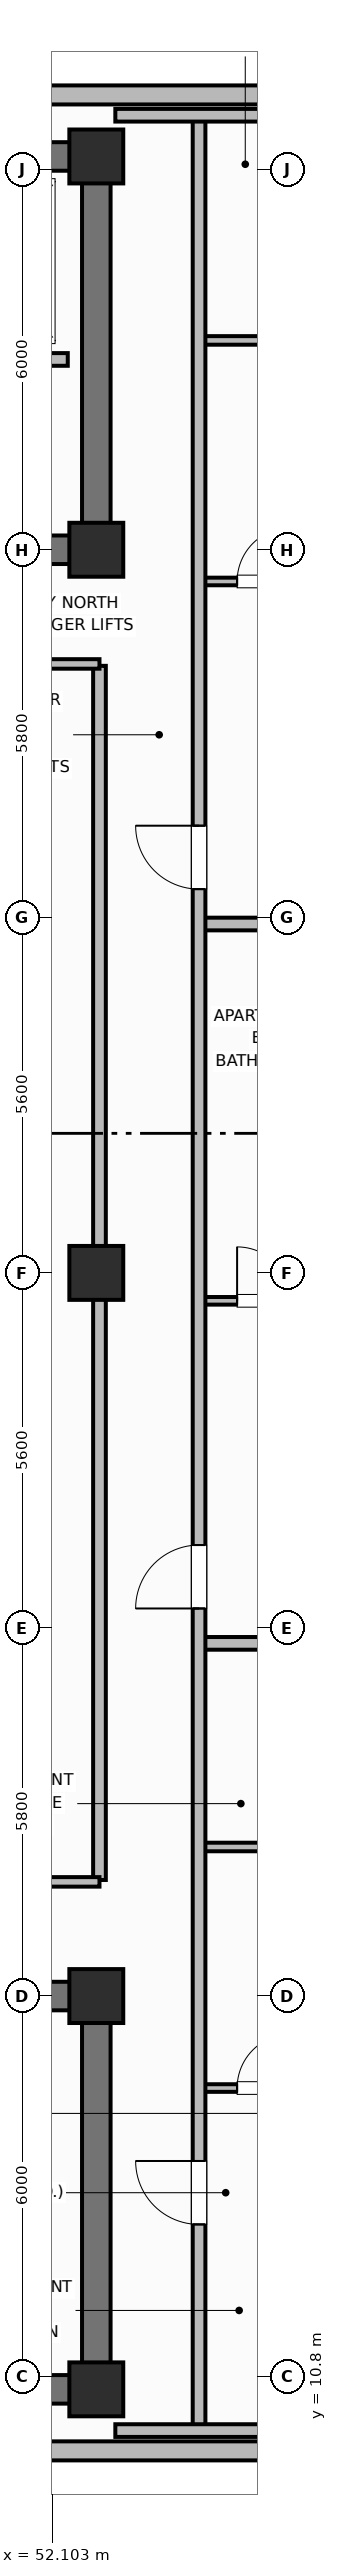
"""IFC4 building model, lengths in metres.
Left out: names, types, materials, properties, quantities, classifications, styles, units other than length and angle.
Written with IfcOpenShell. Run it as: python <this file> out.ifc"""

import sys

from ifc_helpers import new_model, si_unit, direction, frame, frame_2d, origin, origin_2d, place, context, subcontext, project, spatial, rectangle, extrude, element, fill, save


model = new_model("IFC4")
c1 = context("Model", 3, precision=1e-05, world=origin(), true_north=direction((0.0, 1.0)))
c2 = subcontext(c1, "Body", "Model", "MODEL_VIEW")
j1 = project(units=[si_unit("LENGTHUNIT", "METRE"), si_unit("PLANEANGLEUNIT", "RADIAN")], contexts=[c1])
p1 = place(None, origin())
s1 = spatial("IfcSite", under=j1, at=p1, CompositionType="ELEMENT")
p2 = place(p1, origin())
s2 = spatial("IfcBuilding", under=s1, at=p2, CompositionType="ELEMENT")
p3 = place(p2, frame((0.0, 0.0, 229.5)))
s3 = spatial("IfcBuildingStorey", under=s2, at=p3, CompositionType="ELEMENT", Elevation=229.5)
p4 = place(p3, frame((52.8, 10.6, 0.0), z_axis=(0.0, 0.0, 1.0), x_axis=(-1.0, 0.0, 0.0)))
e1 = element("IfcWall", 1, at=p4, inside=s3, PredefinedType="SHEAR", context=c2, shape_type="SweptSolid", body=[
    extrude(rectangle(XDim=27.2, YDim=0.45, at=frame_2d((13.6, 0.0))), origin(), (0.0, 0.0, 1.0), 3.7),
])
p5 = place(p3, frame((52.8, 10.825, 0.0), z_axis=(0.0, 0.0, 1.0), x_axis=(0.0, 1.0, 0.0)))
e2 = element("IfcWall", 2, at=p5, inside=s3, PredefinedType="SHEAR", context=c2, shape_type="SweptSolid", body=[
    extrude(rectangle(XDim=5.75, YDim=0.45, at=frame_2d((2.875, 0.0))), origin(), (0.0, 0.0, 1.0), 3.7),
])
p6 = place(p3, frame((25.6, 16.8, 0.0), z_axis=(0.0, 0.0, 1.0), x_axis=(1.0, 0.0, 0.0)))
e3 = element("IfcWall", 3, at=p6, inside=s3, PredefinedType="SHEAR", context=c2, shape_type="SweptSolid", body=[
    extrude(rectangle(XDim=27.2, YDim=0.45, at=frame_2d((13.6, 0.0))), origin(), (0.0, 0.0, 1.0), 3.7),
])
p7 = place(p6, frame((1.9, 0.0, 0.0)))
e4 = element("IfcOpeningElement", 4, at=p7, cuts=e3, PredefinedType="OPENING", context=c2, shape_type="SweptSolid", body=[
    extrude(rectangle(XDim=1.1, YDim=2.15, at=frame_2d((0.55, 1.075))), frame((0.0, 0.235, 0.0), z_axis=(0.0, -1.0, 0.0), x_axis=(1.0, 0.0, 0.0)), (0.0, 0.0, 1.0), 0.47),
])
p8 = place(p6, frame((13.0, 0.0, 0.0)))
e5 = element("IfcOpeningElement", 5, at=p8, cuts=e3, PredefinedType="OPENING", context=c2, shape_type="SweptSolid", body=[
    extrude(rectangle(XDim=1.2, YDim=2.15, at=frame_2d((0.6, 1.075))), frame((0.0, 0.235, 0.0), z_axis=(0.0, -1.0, 0.0), x_axis=(1.0, 0.0, 0.0)), (0.0, 0.0, 1.0), 0.47),
])
p9 = place(p6, frame((21.6, 0.0, 0.0)))
e6 = element("IfcOpeningElement", 6, at=p9, cuts=e3, PredefinedType="OPENING", context=c2, shape_type="SweptSolid", body=[
    extrude(rectangle(XDim=1.0, YDim=2.15, at=frame_2d((0.5, 1.075))), frame((0.0, 0.235, 0.0), z_axis=(0.0, -1.0, 0.0), x_axis=(1.0, 0.0, 0.0)), (0.0, 0.0, 1.0), 0.47),
])
p10 = place(p3, frame((25.6, 45.8, 0.0), z_axis=(0.0, 0.0, 1.0), x_axis=(1.0, 0.0, 0.0)))
e7 = element("IfcWall", 7, at=p10, inside=s3, PredefinedType="SHEAR", context=c2, shape_type="SweptSolid", body=[
    extrude(rectangle(XDim=27.2, YDim=0.45, at=frame_2d((13.6, 0.0))), origin(), (0.0, 0.0, 1.0), 3.7),
])
p11 = place(p3, frame((52.8, 39.825, 0.0), z_axis=(0.0, 0.0, 1.0), x_axis=(0.0, 1.0, 0.0)))
e8 = element("IfcWall", 8, at=p11, inside=s3, PredefinedType="SHEAR", context=c2, shape_type="SweptSolid", body=[
    extrude(rectangle(XDim=5.75, YDim=0.45, at=frame_2d((2.875, 0.0))), origin(), (0.0, 0.0, 1.0), 3.7),
])
p12 = place(p3, frame((52.8, 39.6, 0.0), z_axis=(0.0, 0.0, 1.0), x_axis=(-1.0, 0.0, 0.0)))
e9 = element("IfcWall", 9, at=p12, inside=s3, PredefinedType="SHEAR", context=c2, shape_type="SweptSolid", body=[
    extrude(rectangle(XDim=27.2, YDim=0.45, at=frame_2d((13.6, 0.0))), origin(), (0.0, 0.0, 1.0), 3.7),
])
p13 = place(p12, frame((24.2, 0.0, 0.0)))
e10 = element("IfcOpeningElement", 10, at=p13, cuts=e9, PredefinedType="OPENING", context=c2, shape_type="SweptSolid", body=[
    extrude(rectangle(XDim=1.1, YDim=2.15, at=frame_2d((0.55, 1.075))), frame((0.0, 0.235, 0.0), z_axis=(0.0, -1.0, 0.0), x_axis=(1.0, 0.0, 0.0)), (0.0, 0.0, 1.0), 0.47),
])
p14 = place(p12, frame((15.1, 0.0, 0.0)))
e11 = element("IfcOpeningElement", 11, at=p14, cuts=e9, PredefinedType="OPENING", context=c2, shape_type="SweptSolid", body=[
    extrude(rectangle(XDim=1.2, YDim=2.15, at=frame_2d((0.6, 1.075))), frame((0.0, 0.235, 0.0), z_axis=(0.0, -1.0, 0.0), x_axis=(1.0, 0.0, 0.0)), (0.0, 0.0, 1.0), 0.47),
])
p15 = place(p12, frame((11.6, 0.0, 0.0)))
e12 = element("IfcOpeningElement", 12, at=p15, cuts=e9, PredefinedType="OPENING", context=c2, shape_type="SweptSolid", body=[
    extrude(rectangle(XDim=0.9, YDim=2.1, at=frame_2d((0.45, 1.05))), frame((0.0, 0.235, 0.0), z_axis=(0.0, -1.0, 0.0), x_axis=(1.0, 0.0, 0.0)), (0.0, 0.0, 1.0), 0.47),
])
p16 = place(p12, frame((7.35, 0.0, 0.0)))
e13 = element("IfcOpeningElement", 13, at=p16, cuts=e9, PredefinedType="OPENING", context=c2, shape_type="SweptSolid", body=[
    extrude(rectangle(XDim=0.85, YDim=2.1, at=frame_2d((0.425, 1.05))), frame((0.0, 0.235, 0.0), z_axis=(0.0, -1.0, 0.0), x_axis=(1.0, 0.0, 0.0)), (0.0, 0.0, 1.0), 0.47),
])
p17 = place(p12, frame((4.2, 0.0, 0.0)))
e14 = element("IfcOpeningElement", 14, at=p17, cuts=e9, PredefinedType="OPENING", context=c2, shape_type="SweptSolid", body=[
    extrude(rectangle(XDim=1.3, YDim=2.2, at=frame_2d((0.65, 1.1))), frame((0.0, 0.235, 0.0), z_axis=(0.0, -1.0, 0.0), x_axis=(1.0, 0.0, 0.0)), (0.0, 0.0, 1.0), 0.47),
])
for number, where, z_axis, x_axis in (
    (15, (52.8, 10.6, 0.0), (0.0, 0.0, 1.0), (1.0, 0.0, 0.0)),
    (16, (52.8, 16.8, 0.0), (0.0, 0.0, 1.0), (1.0, 0.0, 0.0)),
    (17, (52.8, 39.6, 0.0), (0.0, 0.0, 1.0), (1.0, 0.0, 0.0)),
    (18, (52.8, 45.8, 0.0), (0.0, 0.0, 1.0), (1.0, 0.0, 0.0)),
    (19, (52.8, 28.2, 0.0), (0.0, 0.0, 1.0), (1.0, 0.0, 0.0)),
):
    element("IfcColumn", number, at=place(p3, frame(where, z_axis=z_axis, x_axis=x_axis)), inside=s3, PredefinedType="COLUMN", context=c2, shape_type="SweptSolid", body=[
        extrude(rectangle(XDim=0.85, YDim=0.85, at=origin_2d()), origin(), (0.0, 0.0, 1.0), 3.7),
    ])
p18 = place(p3, frame((22.56, 9.63, 0.0), z_axis=(0.0, 0.0, 1.0), x_axis=(1.0, 0.0, 0.0)))
e20 = element("IfcWall", 20, at=p18, inside=s3, PredefinedType="SOLIDWALL", context=c2, shape_type="SweptSolid", body=[
    extrude(rectangle(XDim=33.28, YDim=0.3, at=frame_2d((16.64, 0.0))), origin(), (0.0, 0.0, 1.0), 2.73),
])
p19 = place(p18, frame((4.747, 0.0, 0.76)))
e21 = element("IfcOpeningElement", 21, at=p19, cuts=e20, PredefinedType="OPENING", context=c2, shape_type="SweptSolid", body=[
    extrude(rectangle(XDim=1.4, YDim=1.85, at=frame_2d((0.7, 0.925))), frame((0.0, 0.16, 0.0), z_axis=(0.0, -1.0, 0.0), x_axis=(1.0, 0.0, 0.0)), (0.0, 0.0, 1.0), 0.32),
])
p20 = place(p18, frame((7.945, 0.0, 0.76)))
e22 = element("IfcOpeningElement", 22, at=p20, cuts=e20, PredefinedType="OPENING", context=c2, shape_type="SweptSolid", body=[
    extrude(rectangle(XDim=1.4, YDim=1.85, at=frame_2d((0.7, 0.925))), frame((0.0, 0.16, 0.0), z_axis=(0.0, -1.0, 0.0), x_axis=(1.0, 0.0, 0.0)), (0.0, 0.0, 1.0), 0.32),
])
p21 = place(p18, frame((14.341, 0.0, 0.76)))
e23 = element("IfcOpeningElement", 23, at=p21, cuts=e20, PredefinedType="OPENING", context=c2, shape_type="SweptSolid", body=[
    extrude(rectangle(XDim=1.4, YDim=1.85, at=frame_2d((0.7, 0.925))), frame((0.0, 0.16, 0.0), z_axis=(0.0, -1.0, 0.0), x_axis=(1.0, 0.0, 0.0)), (0.0, 0.0, 1.0), 0.32),
])
p22 = place(p18, frame((17.539, 0.0, 0.76)))
e24 = element("IfcOpeningElement", 24, at=p22, cuts=e20, PredefinedType="OPENING", context=c2, shape_type="SweptSolid", body=[
    extrude(rectangle(XDim=1.4, YDim=1.85, at=frame_2d((0.7, 0.925))), frame((0.0, 0.16, 0.0), z_axis=(0.0, -1.0, 0.0), x_axis=(1.0, 0.0, 0.0)), (0.0, 0.0, 1.0), 0.32),
])
p23 = place(p18, frame((23.935, 0.0, 0.76)))
e25 = element("IfcOpeningElement", 25, at=p23, cuts=e20, PredefinedType="OPENING", context=c2, shape_type="SweptSolid", body=[
    extrude(rectangle(XDim=1.4, YDim=1.85, at=frame_2d((0.7, 0.925))), frame((0.0, 0.16, 0.0), z_axis=(0.0, -1.0, 0.0), x_axis=(1.0, 0.0, 0.0)), (0.0, 0.0, 1.0), 0.32),
])
p24 = place(p18, frame((27.133, 0.0, 0.76)))
e26 = element("IfcOpeningElement", 26, at=p24, cuts=e20, PredefinedType="OPENING", context=c2, shape_type="SweptSolid", body=[
    extrude(rectangle(XDim=1.4, YDim=1.85, at=frame_2d((0.7, 0.925))), frame((0.0, 0.16, 0.0), z_axis=(0.0, -1.0, 0.0), x_axis=(1.0, 0.0, 0.0)), (0.0, 0.0, 1.0), 0.32),
])
p25 = place(p3, frame((55.84, 46.77, 0.0), z_axis=(0.0, 0.0, 1.0), x_axis=(-1.0, 0.0, 0.0)))
e27 = element("IfcWall", 27, at=p25, inside=s3, PredefinedType="SOLIDWALL", context=c2, shape_type="SweptSolid", body=[
    extrude(rectangle(XDim=33.28, YDim=0.3, at=frame_2d((16.64, 0.0))), origin(), (0.0, 0.0, 1.0), 2.73),
])
p26 = place(p25, frame((5.08, 0.0, 0.76)))
e28 = element("IfcOpeningElement", 28, at=p26, cuts=e27, PredefinedType="OPENING", context=c2, shape_type="SweptSolid", body=[
    extrude(rectangle(XDim=1.8, YDim=1.85, at=frame_2d((0.9, 0.925))), frame((0.0, 0.16, 0.0), z_axis=(0.0, -1.0, 0.0), x_axis=(1.0, 0.0, 0.0)), (0.0, 0.0, 1.0), 0.32),
])
p27 = place(p25, frame((8.633, 0.0, 0.76)))
e29 = element("IfcOpeningElement", 29, at=p27, cuts=e27, PredefinedType="OPENING", context=c2, shape_type="SweptSolid", body=[
    extrude(rectangle(XDim=1.8, YDim=1.85, at=frame_2d((0.9, 0.925))), frame((0.0, 0.16, 0.0), z_axis=(0.0, -1.0, 0.0), x_axis=(1.0, 0.0, 0.0)), (0.0, 0.0, 1.0), 0.32),
])
p28 = place(p25, frame((15.74, 0.0, 0.76)))
e30 = element("IfcOpeningElement", 30, at=p28, cuts=e27, PredefinedType="OPENING", context=c2, shape_type="SweptSolid", body=[
    extrude(rectangle(XDim=1.8, YDim=1.85, at=frame_2d((0.9, 0.925))), frame((0.0, 0.16, 0.0), z_axis=(0.0, -1.0, 0.0), x_axis=(1.0, 0.0, 0.0)), (0.0, 0.0, 1.0), 0.32),
])
p29 = place(p25, frame((22.847, 0.0, 0.76)))
e31 = element("IfcOpeningElement", 31, at=p29, cuts=e27, PredefinedType="OPENING", context=c2, shape_type="SweptSolid", body=[
    extrude(rectangle(XDim=1.8, YDim=1.85, at=frame_2d((0.9, 0.925))), frame((0.0, 0.16, 0.0), z_axis=(0.0, -1.0, 0.0), x_axis=(1.0, 0.0, 0.0)), (0.0, 0.0, 1.0), 0.32),
])
p30 = place(p25, frame((26.4, 0.0, 0.76)))
e32 = element("IfcOpeningElement", 32, at=p30, cuts=e27, PredefinedType="OPENING", context=c2, shape_type="SweptSolid", body=[
    extrude(rectangle(XDim=1.8, YDim=1.85, at=frame_2d((0.9, 0.925))), frame((0.0, 0.16, 0.0), z_axis=(0.0, -1.0, 0.0), x_axis=(1.0, 0.0, 0.0)), (0.0, 0.0, 1.0), 0.32),
])
p31 = place(p3, frame((52.35, 42.6, 0.0), z_axis=(0.0, 0.0, 1.0), x_axis=(-1.0, 0.0, 0.0)))
e33 = element("IfcWall", 33, at=p31, inside=s3, PredefinedType="PARTITIONING", context=c2, shape_type="SweptSolid", body=[
    extrude(rectangle(XDim=6.5, YDim=0.2, at=frame_2d((3.25, 0.0))), origin(), (0.0, 0.0, 1.0), 2.56),
])
p32 = place(p31, frame((4.9, 0.0, 0.0)))
e34 = element("IfcOpeningElement", 34, at=p32, cuts=e33, PredefinedType="OPENING", context=c2, shape_type="SweptSolid", body=[
    extrude(rectangle(XDim=1.0, YDim=2.15, at=frame_2d((0.5, 1.075))), frame((0.0, 0.11, 0.0), z_axis=(0.0, -1.0, 0.0), x_axis=(1.0, 0.0, 0.0)), (0.0, 0.0, 1.0), 0.22),
])
p33 = place(p31, frame((2.8, 0.0, 0.0)))
e35 = element("IfcOpeningElement", 35, at=p33, cuts=e33, PredefinedType="OPENING", context=c2, shape_type="SweptSolid", body=[
    extrude(rectangle(XDim=1.0, YDim=2.15, at=frame_2d((0.5, 1.075))), frame((0.0, 0.11, 0.0), z_axis=(0.0, -1.0, 0.0), x_axis=(1.0, 0.0, 0.0)), (0.0, 0.0, 1.0), 0.22),
])
p34 = place(p31, frame((0.7, 0.0, 0.0)))
e36 = element("IfcOpeningElement", 36, at=p34, cuts=e33, PredefinedType="OPENING", context=c2, shape_type="SweptSolid", body=[
    extrude(rectangle(XDim=1.0, YDim=2.15, at=frame_2d((0.5, 1.075))), frame((0.0, 0.11, 0.0), z_axis=(0.0, -1.0, 0.0), x_axis=(1.0, 0.0, 0.0)), (0.0, 0.0, 1.0), 0.22),
])
p35 = place(p3, frame((52.85, 18.63, 0.0), z_axis=(0.0, 0.0, 1.0), x_axis=(0.0, 1.0, 0.0)))
e37 = element("IfcWall", 37, at=p35, inside=s3, PredefinedType="PARTITIONING", context=c2, shape_type="SweptSolid", body=[
    extrude(rectangle(XDim=19.14, YDim=0.2, at=frame_2d((9.57, 0.0))), origin(), (0.0, 0.0, 1.0), 2.56),
])
for number, where, z_axis, x_axis in (
    (38, (30.7, 18.6, 0.0), (0.0, 0.0, 1.0), (1.0, 0.0, 0.0)),
    (39, (30.7, 37.8, 0.0), (0.0, 0.0, 1.0), (1.0, 0.0, 0.0)),
):
    element("IfcWall", number, at=place(p3, frame(where, z_axis=z_axis, x_axis=x_axis)), inside=s3, PredefinedType="PARTITIONING", context=c2, shape_type="SweptSolid", body=[
        extrude(rectangle(XDim=22.15, YDim=0.15, at=frame_2d((11.075, 0.0))), origin(), (0.0, 0.0, 1.0), 2.56),
    ])
p36 = place(p3, frame((54.42, 15.35, 0.0), z_axis=(0.0, 0.0, 1.0), x_axis=(1.0, 0.0, 0.0)))
e40 = element("IfcWall", 40, at=p36, inside=s3, PredefinedType="PARTITIONING", context=c2, shape_type="SweptSolid", body=[
    extrude(rectangle(XDim=1.95, YDim=0.12, at=frame_2d((0.975, 0.0))), origin(), (0.0, 0.0, 1.0), 2.56),
])
p37 = place(p36, frame((0.6, 0.0, 0.0)))
e41 = element("IfcOpeningElement", 41, at=p37, cuts=e40, PredefinedType="OPENING", context=c2, shape_type="SweptSolid", body=[
    extrude(rectangle(XDim=0.85, YDim=2.1, at=frame_2d((0.425, 1.05))), frame((0.0, 0.07, 0.0), z_axis=(0.0, -1.0, 0.0), x_axis=(1.0, 0.0, 0.0)), (0.0, 0.0, 1.0), 0.14),
])
p38 = place(p3, frame((54.42, 19.15, 0.0), z_axis=(0.0, 0.0, 1.0), x_axis=(1.0, 0.0, 0.0)))
e42 = element("IfcWall", 42, at=p38, inside=s3, PredefinedType="PARTITIONING", context=c2, shape_type="SweptSolid", body=[
    extrude(rectangle(XDim=1.95, YDim=0.135, at=frame_2d((0.975, 0.0))), origin(), (0.0, 0.0, 1.0), 2.56),
])
p39 = place(p3, frame((54.42, 22.36, 0.0), z_axis=(0.0, 0.0, 1.0), x_axis=(1.0, 0.0, 0.0)))
e43 = element("IfcWall", 43, at=p39, inside=s3, PredefinedType="PARTITIONING", context=c2, shape_type="SweptSolid", body=[
    extrude(rectangle(XDim=4.45, YDim=0.2, at=frame_2d((2.225, 0.0))), origin(), (0.0, 0.0, 1.0), 2.56),
])
p40 = place(p3, frame((54.42, 27.76, 0.0), z_axis=(0.0, 0.0, 1.0), x_axis=(1.0, 0.0, 0.0)))
e44 = element("IfcWall", 44, at=p40, inside=s3, PredefinedType="PARTITIONING", context=c2, shape_type="SweptSolid", body=[
    extrude(rectangle(XDim=1.95, YDim=0.12, at=frame_2d((0.975, 0.0))), origin(), (0.0, 0.0, 1.0), 2.56),
])
p41 = place(p40, frame((0.6, 0.0, 0.0)))
e45 = element("IfcOpeningElement", 45, at=p41, cuts=e44, PredefinedType="OPENING", context=c2, shape_type="SweptSolid", body=[
    extrude(rectangle(XDim=0.85, YDim=2.1, at=frame_2d((0.425, 1.05))), frame((0.0, 0.07, 0.0), z_axis=(0.0, -1.0, 0.0), x_axis=(1.0, 0.0, 0.0)), (0.0, 0.0, 1.0), 0.14),
])
p42 = place(p3, frame((54.42, 33.7, 0.0), z_axis=(0.0, 0.0, 1.0), x_axis=(1.0, 0.0, 0.0)))
e46 = element("IfcWall", 46, at=p42, inside=s3, PredefinedType="PARTITIONING", context=c2, shape_type="SweptSolid", body=[
    extrude(rectangle(XDim=4.45, YDim=0.2, at=frame_2d((2.225, 0.0))), origin(), (0.0, 0.0, 1.0), 2.56),
])
p43 = place(p3, frame((54.42, 39.1, 0.0), z_axis=(0.0, 0.0, 1.0), x_axis=(1.0, 0.0, 0.0)))
e47 = element("IfcWall", 47, at=p43, inside=s3, PredefinedType="PARTITIONING", context=c2, shape_type="SweptSolid", body=[
    extrude(rectangle(XDim=1.95, YDim=0.12, at=frame_2d((0.975, 0.0))), origin(), (0.0, 0.0, 1.0), 2.56),
])
p44 = place(p43, frame((0.6, 0.0, 0.0)))
e48 = element("IfcOpeningElement", 48, at=p44, cuts=e47, PredefinedType="OPENING", context=c2, shape_type="SweptSolid", body=[
    extrude(rectangle(XDim=0.85, YDim=2.1, at=frame_2d((0.425, 1.05))), frame((0.0, 0.07, 0.0), z_axis=(0.0, -1.0, 0.0), x_axis=(1.0, 0.0, 0.0)), (0.0, 0.0, 1.0), 0.14),
])
p45 = place(p3, frame((54.42, 42.9, 0.0), z_axis=(0.0, 0.0, 1.0), x_axis=(1.0, 0.0, 0.0)))
e49 = element("IfcWall", 49, at=p45, inside=s3, PredefinedType="PARTITIONING", context=c2, shape_type="SweptSolid", body=[
    extrude(rectangle(XDim=1.95, YDim=0.135, at=frame_2d((0.975, 0.0))), origin(), (0.0, 0.0, 1.0), 2.56),
])
p46 = place(p3, frame((54.42, 9.95, 0.0), z_axis=(0.0, 0.0, 1.0), x_axis=(0.0, 1.0, 0.0)))
e50 = element("IfcWall", 50, at=p46, inside=s3, PredefinedType="PARTITIONING", context=c2, shape_type="SweptSolid", body=[
    extrude(rectangle(XDim=36.5, YDim=0.2, at=frame_2d((18.25, 0.0))), origin(), (0.0, 0.0, 1.0), 2.56),
])
p47 = place(p46, frame((3.25, 0.0, 0.0)))
e51 = element("IfcOpeningElement", 51, at=p47, cuts=e50, PredefinedType="OPENING", context=c2, shape_type="SweptSolid", body=[
    extrude(rectangle(XDim=1.0, YDim=2.15, at=frame_2d((0.5, 1.075))), frame((0.0, 0.11, 0.0), z_axis=(0.0, -1.0, 0.0), x_axis=(1.0, 0.0, 0.0)), (0.0, 0.0, 1.0), 0.22),
])
p48 = place(p46, frame((12.96, 0.0, 0.0)))
e52 = element("IfcOpeningElement", 52, at=p48, cuts=e50, PredefinedType="OPENING", context=c2, shape_type="SweptSolid", body=[
    extrude(rectangle(XDim=1.0, YDim=2.15, at=frame_2d((0.5, 1.075))), frame((0.0, 0.11, 0.0), z_axis=(0.0, -1.0, 0.0), x_axis=(1.0, 0.0, 0.0)), (0.0, 0.0, 1.0), 0.22),
])
p49 = place(p46, frame((24.3, 0.0, 0.0)))
e53 = element("IfcOpeningElement", 53, at=p49, cuts=e50, PredefinedType="OPENING", context=c2, shape_type="SweptSolid", body=[
    extrude(rectangle(XDim=1.0, YDim=2.15, at=frame_2d((0.5, 1.075))), frame((0.0, 0.11, 0.0), z_axis=(0.0, -1.0, 0.0), x_axis=(1.0, 0.0, 0.0)), (0.0, 0.0, 1.0), 0.22),
])
for number, where, z_axis, x_axis in (
    (54, (53.1, 9.95, 0.0), (0.0, 0.0, 1.0), (1.0, 0.0, 0.0)),
    (55, (53.1, 46.45, 0.0), (0.0, 0.0, 1.0), (1.0, 0.0, 0.0)),
):
    element("IfcWall", number, at=place(p3, frame(where, z_axis=z_axis, x_axis=x_axis)), inside=s3, PredefinedType="PARTITIONING", context=c2, shape_type="SweptSolid", body=[
        extrude(rectangle(XDim=3.754, YDim=0.2, at=frame_2d((1.877, 0.0))), origin(), (0.0, 0.0, 1.0), 2.56),
    ])
p50 = place(p37, origin())
e56 = element("IfcDoor", 56, at=p50, inside=s3, OperationType="SINGLE_SWING_RIGHT", PredefinedType="DOOR", context=c2, shape_type="SweptSolid", body=[
    extrude(rectangle(XDim=0.85, YDim=2.1, at=frame_2d((0.425, 1.05))), frame((0.0, 0.025, 0.0), z_axis=(0.0, -1.0, 0.0), x_axis=(1.0, 0.0, 0.0)), (0.0, 0.0, 1.0), 0.05),
])
fill(e41, e56)
p51 = place(p41, origin())
e57 = element("IfcDoor", 57, at=p51, inside=s3, OperationType="SINGLE_SWING_LEFT", PredefinedType="DOOR", context=c2, shape_type="SweptSolid", body=[
    extrude(rectangle(XDim=0.85, YDim=2.1, at=frame_2d((0.425, 1.05))), frame((0.0, 0.025, 0.0), z_axis=(0.0, -1.0, 0.0), x_axis=(1.0, 0.0, 0.0)), (0.0, 0.0, 1.0), 0.05),
])
fill(e45, e57)
p52 = place(p44, origin())
e58 = element("IfcDoor", 58, at=p52, inside=s3, OperationType="SINGLE_SWING_RIGHT", PredefinedType="DOOR", context=c2, shape_type="SweptSolid", body=[
    extrude(rectangle(XDim=0.85, YDim=2.1, at=frame_2d((0.425, 1.05))), frame((0.0, 0.025, 0.0), z_axis=(0.0, -1.0, 0.0), x_axis=(1.0, 0.0, 0.0)), (0.0, 0.0, 1.0), 0.05),
])
fill(e48, e58)
p53 = place(p47, origin())
e59 = element("IfcDoor", 59, at=p53, inside=s3, OperationType="SINGLE_SWING_RIGHT", PredefinedType="DOOR", context=c2, shape_type="SweptSolid", body=[
    extrude(rectangle(XDim=1.0, YDim=2.15, at=frame_2d((0.5, 1.075))), frame((0.0, 0.025, 0.0), z_axis=(0.0, -1.0, 0.0), x_axis=(1.0, 0.0, 0.0)), (0.0, 0.0, 1.0), 0.05),
])
fill(e51, e59)
p54 = place(p48, origin())
e60 = element("IfcDoor", 60, at=p54, inside=s3, OperationType="SINGLE_SWING_LEFT", PredefinedType="DOOR", context=c2, shape_type="SweptSolid", body=[
    extrude(rectangle(XDim=1.0, YDim=2.15, at=frame_2d((0.5, 1.075))), frame((0.0, 0.025, 0.0), z_axis=(0.0, -1.0, 0.0), x_axis=(1.0, 0.0, 0.0)), (0.0, 0.0, 1.0), 0.05),
])
fill(e52, e60)
p55 = place(p49, origin())
e61 = element("IfcDoor", 61, at=p55, inside=s3, OperationType="SINGLE_SWING_RIGHT", PredefinedType="DOOR", context=c2, shape_type="SweptSolid", body=[
    extrude(rectangle(XDim=1.0, YDim=2.15, at=frame_2d((0.5, 1.075))), frame((0.0, 0.025, 0.0), z_axis=(0.0, -1.0, 0.0), x_axis=(1.0, 0.0, 0.0)), (0.0, 0.0, 1.0), 0.05),
])
fill(e53, e61)
save(model, sys.argv[1])
